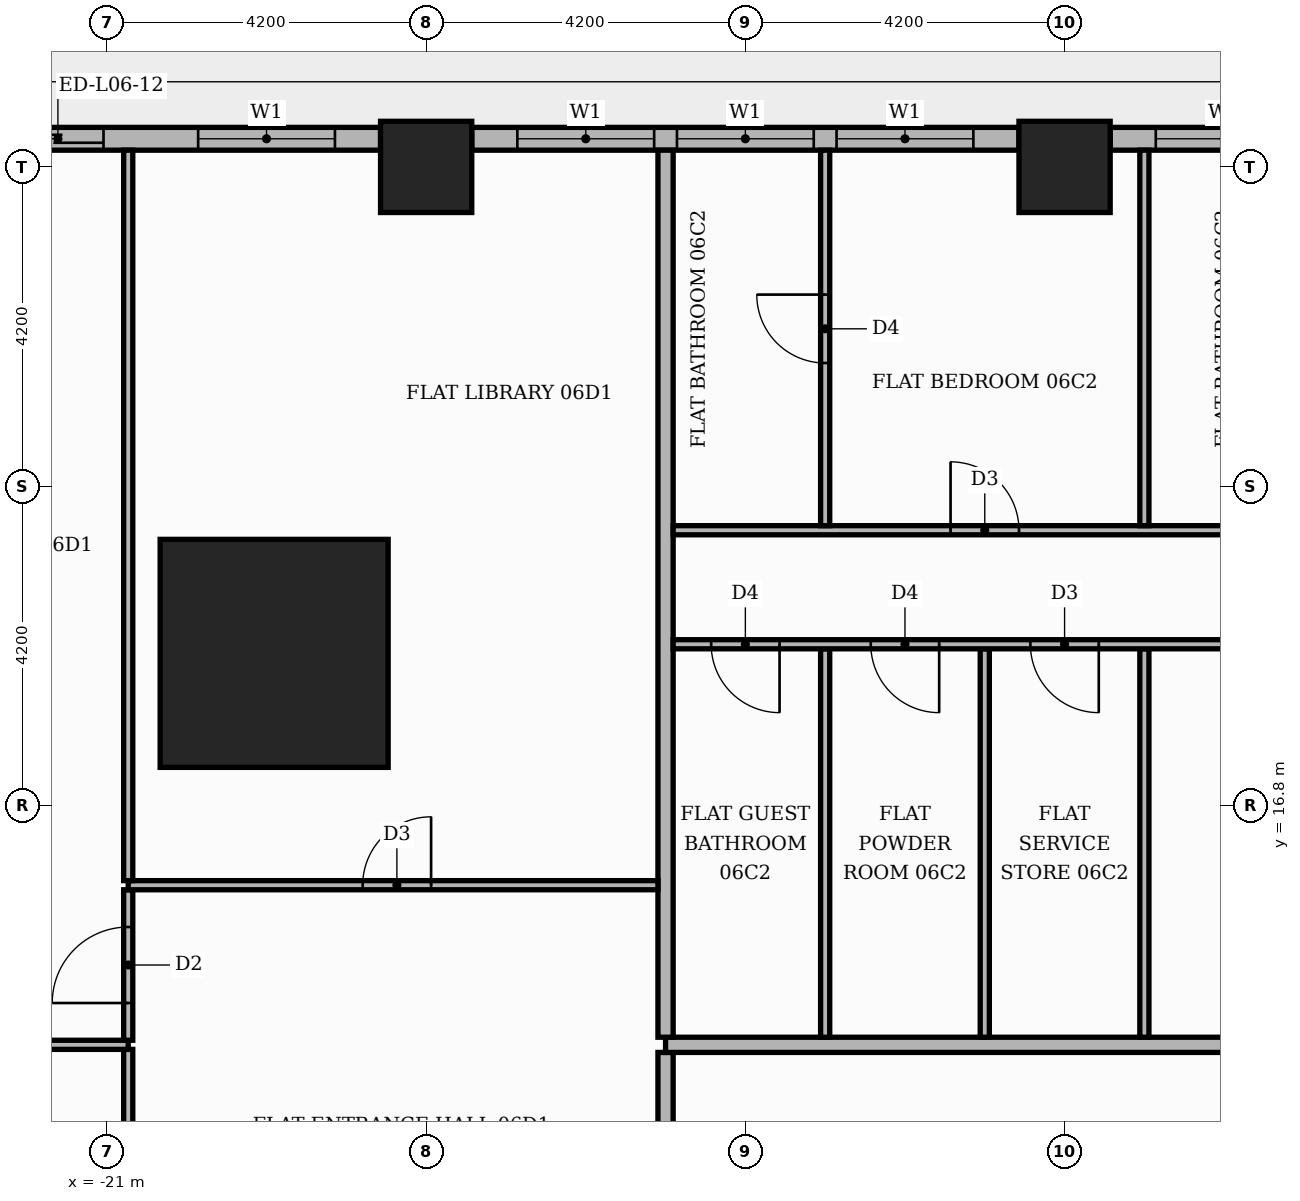
"""IFC4 building model, lengths in metres.
Left out: names, types, materials, properties, quantities, classifications, styles, units other than length and angle.
Written with IfcOpenShell. Run it as: python <this file> out.ifc"""

import sys

from ifc_helpers import new_model, si_unit, direction, frame, frame_2d, origin, origin_2d, place, context, subcontext, project, spatial, rectangle, extrude, element, fill, save


model = new_model("IFC4")
c1 = context("Model", 3, precision=1e-05, world=origin(), true_north=direction((0.0, 1.0)))
c2 = subcontext(c1, "Body", "Model", "MODEL_VIEW")
j1 = project(units=[si_unit("LENGTHUNIT", "METRE"), si_unit("PLANEANGLEUNIT", "RADIAN")], contexts=[c1])
p1 = place(None, origin())
s1 = spatial("IfcSite", under=j1, at=p1, CompositionType="ELEMENT")
p2 = place(p1, origin())
s2 = spatial("IfcBuilding", under=s1, at=p2, CompositionType="ELEMENT")
p3 = place(p2, frame((0.0, 0.0, 30.9)))
s3 = spatial("IfcBuildingStorey", under=s2, at=p3, CompositionType="ELEMENT", Elevation=30.9)
p4 = place(p3, frame((-18.8, 18.8, 0.0), z_axis=(0.0, 0.0, 1.0), x_axis=(1.0, 0.0, 0.0)))
e1 = element("IfcColumn", 1, at=p4, inside=s3, PredefinedType="COLUMN", context=c2, shape_type="SweptSolid", body=[
    extrude(rectangle(XDim=3.0, YDim=3.0, at=origin_2d()), origin(), (0.0, 0.0, 1.0), 3.9),
])
for number, where, z_axis, x_axis in (
    (2, (-8.4, 25.2, 0.0), (0.0, 0.0, 1.0), (1.0, 0.0, 0.0)),
    (3, (-16.8, 25.2, 0.0), (0.0, 0.0, 1.0), (1.0, 0.0, 0.0)),
):
    element("IfcColumn", number, at=place(p3, frame(where, z_axis=z_axis, x_axis=x_axis)), inside=s3, PredefinedType="COLUMN", context=c2, shape_type="SweptSolid", body=[
        extrude(rectangle(XDim=1.2, YDim=1.2, at=origin_2d()), origin(), (0.0, 0.0, 1.0), 3.9),
    ])
p5 = place(p3, frame((-0.6, 25.57, 0.0), z_axis=(0.0, 0.0, 1.0), x_axis=(-1.0, 0.0, 0.0)))
e4 = element("IfcWall", 4, at=p5, inside=s3, PredefinedType="STANDARD", context=c2, shape_type="SweptSolid", body=[
    extrude(rectangle(XDim=7.2, YDim=0.3, at=frame_2d((3.6, 0.0))), origin(), (0.0, 0.0, 1.0), 3.48),
])
p6 = place(p5, frame((0.6, 0.0, 0.0)))
e5 = element("IfcOpeningElement", 5, at=p6, cuts=e4, PredefinedType="OPENING", context=c2, shape_type="SweptSolid", body=[
    extrude(rectangle(XDim=1.8, YDim=2.4, at=frame_2d((0.9, 1.2))), frame((0.0, 0.16, 0.0), z_axis=(0.0, -1.0, 0.0), x_axis=(1.0, 0.0, 0.0)), (0.0, 0.0, 1.0), 0.32),
])
p7 = place(p5, frame((2.7, 0.0, 0.9)))
e6 = element("IfcOpeningElement", 6, at=p7, cuts=e4, PredefinedType="OPENING", context=c2, shape_type="SweptSolid", body=[
    extrude(rectangle(XDim=1.8, YDim=2.1, at=frame_2d((0.9, 1.05))), frame((0.0, 0.16, 0.0), z_axis=(0.0, -1.0, 0.0), x_axis=(1.0, 0.0, 0.0)), (0.0, 0.0, 1.0), 0.32),
])
p8 = place(p5, frame((4.8, 0.0, 0.9)))
e7 = element("IfcOpeningElement", 7, at=p8, cuts=e4, PredefinedType="OPENING", context=c2, shape_type="SweptSolid", body=[
    extrude(rectangle(XDim=1.8, YDim=2.1, at=frame_2d((0.9, 1.05))), frame((0.0, 0.16, 0.0), z_axis=(0.0, -1.0, 0.0), x_axis=(1.0, 0.0, 0.0)), (0.0, 0.0, 1.0), 0.32),
])
p9 = place(p3, frame((-9.0, 25.57, 0.0), z_axis=(0.0, 0.0, 1.0), x_axis=(-1.0, 0.0, 0.0)))
e8 = element("IfcWall", 8, at=p9, inside=s3, PredefinedType="STANDARD", context=c2, shape_type="SweptSolid", body=[
    extrude(rectangle(XDim=7.2, YDim=0.3, at=frame_2d((3.6, 0.0))), origin(), (0.0, 0.0, 1.0), 3.48),
])
p10 = place(p9, frame((0.6, 0.0, 0.9)))
e9 = element("IfcOpeningElement", 9, at=p10, cuts=e8, PredefinedType="OPENING", context=c2, shape_type="SweptSolid", body=[
    extrude(rectangle(XDim=1.8, YDim=2.1, at=frame_2d((0.9, 1.05))), frame((0.0, 0.16, 0.0), z_axis=(0.0, -1.0, 0.0), x_axis=(1.0, 0.0, 0.0)), (0.0, 0.0, 1.0), 0.32),
])
p11 = place(p9, frame((2.7, 0.0, 0.9)))
e10 = element("IfcOpeningElement", 10, at=p11, cuts=e8, PredefinedType="OPENING", context=c2, shape_type="SweptSolid", body=[
    extrude(rectangle(XDim=1.8, YDim=2.1, at=frame_2d((0.9, 1.05))), frame((0.0, 0.16, 0.0), z_axis=(0.0, -1.0, 0.0), x_axis=(1.0, 0.0, 0.0)), (0.0, 0.0, 1.0), 0.32),
])
p12 = place(p9, frame((4.8, 0.0, 0.9)))
e11 = element("IfcOpeningElement", 11, at=p12, cuts=e8, PredefinedType="OPENING", context=c2, shape_type="SweptSolid", body=[
    extrude(rectangle(XDim=1.8, YDim=2.1, at=frame_2d((0.9, 1.05))), frame((0.0, 0.16, 0.0), z_axis=(0.0, -1.0, 0.0), x_axis=(1.0, 0.0, 0.0)), (0.0, 0.0, 1.0), 0.32),
])
p13 = place(p3, frame((-17.4, 25.57, 0.0), z_axis=(0.0, 0.0, 1.0), x_axis=(-1.0, 0.0, 0.0)))
e12 = element("IfcWall", 12, at=p13, inside=s3, PredefinedType="STANDARD", context=c2, shape_type="SweptSolid", body=[
    extrude(rectangle(XDim=5.32, YDim=0.3, at=frame_2d((2.66, 0.0))), origin(), (0.0, 0.0, 1.0), 3.48),
])
p14 = place(p13, frame((0.6, 0.0, 0.9)))
e13 = element("IfcOpeningElement", 13, at=p14, cuts=e12, PredefinedType="OPENING", context=c2, shape_type="SweptSolid", body=[
    extrude(rectangle(XDim=1.8, YDim=2.1, at=frame_2d((0.9, 1.05))), frame((0.0, 0.16, 0.0), z_axis=(0.0, -1.0, 0.0), x_axis=(1.0, 0.0, 0.0)), (0.0, 0.0, 1.0), 0.32),
])
p15 = place(p13, frame((3.645, 0.0, 0.0)))
e14 = element("IfcOpeningElement", 14, at=p15, cuts=e12, PredefinedType="OPENING", context=c2, shape_type="SweptSolid", body=[
    extrude(rectangle(XDim=1.2, YDim=2.4, at=frame_2d((0.6, 1.2))), frame((0.0, 0.16, 0.0), z_axis=(0.0, -1.0, 0.0), x_axis=(1.0, 0.0, 0.0)), (0.0, 0.0, 1.0), 0.32),
])
p16 = place(p3, frame((-13.65, -13.55, 0.0), z_axis=(0.0, 0.0, 1.0), x_axis=(0.0, 1.0, 0.0)))
e15 = element("IfcWall", 15, at=p16, inside=s3, PredefinedType="PARTITIONING", context=c2, shape_type="SweptSolid", body=[
    extrude(rectangle(XDim=27.1, YDim=0.2, at=frame_2d((13.55, 0.0))), origin(), (0.0, 0.0, 1.0), 3.48),
])
p17 = place(p16, frame((24.55, 0.0, 0.0)))
e16 = element("IfcOpeningElement", 16, at=p17, cuts=e15, PredefinedType="OPENING", context=c2, shape_type="SweptSolid", body=[
    extrude(rectangle(XDim=1.1, YDim=2.4, at=frame_2d((0.55, 1.2))), frame((0.0, 0.11, 0.0), z_axis=(0.0, -1.0, 0.0), x_axis=(1.0, 0.0, 0.0)), (0.0, 0.0, 1.0), 0.22),
])
p18 = place(p3, frame((-20.72, 9.51, 0.0), z_axis=(0.0, 0.0, 1.0), x_axis=(0.0, 1.0, 0.0)))
e17 = element("IfcWall", 17, at=p18, inside=s3, PredefinedType="PARTITIONING", context=c2, shape_type="SweptSolid", body=[
    extrude(rectangle(XDim=4.08, YDim=0.12, at=frame_2d((2.04, 0.0))), origin(), (0.0, 0.0, 1.0), 3.48),
])
p19 = place(p18, frame((1.59, 0.0, 0.0)))
e18 = element("IfcOpeningElement", 18, at=p19, cuts=e17, PredefinedType="OPENING", context=c2, shape_type="SweptSolid", body=[
    extrude(rectangle(XDim=0.9, YDim=2.1, at=frame_2d((0.45, 1.05))), frame((0.0, 0.07, 0.0), z_axis=(0.0, -1.0, 0.0), x_axis=(1.0, 0.0, 0.0)), (0.0, 0.0, 1.0), 0.14),
])
p20 = place(p3, frame((-25.42, 13.65, 0.0), z_axis=(0.0, 0.0, 1.0), x_axis=(1.0, 0.0, 0.0)))
e19 = element("IfcWall", 19, at=p20, inside=s3, PredefinedType="PARTITIONING", context=c2, shape_type="SweptSolid", body=[
    extrude(rectangle(XDim=4.7, YDim=0.12, at=frame_2d((2.35, 0.0))), origin(), (0.0, 0.0, 1.0), 3.48),
])
p21 = place(p3, frame((-13.65, 13.65, 0.0), z_axis=(0.0, 0.0, 1.0), x_axis=(1.0, 0.0, 0.0)))
e20 = element("IfcWall", 20, at=p21, inside=s3, PredefinedType="PARTITIONING", context=c2, shape_type="SweptSolid", body=[
    extrude(rectangle(XDim=39.07, YDim=0.2, at=frame_2d((19.535, 0.0))), origin(), (0.0, 0.0, 1.0), 3.48),
])
p22 = place(p21, frame((24.65, 0.0, 0.0)))
e21 = element("IfcOpeningElement", 21, at=p22, cuts=e20, PredefinedType="OPENING", context=c2, shape_type="SweptSolid", body=[
    extrude(rectangle(XDim=1.1, YDim=2.4, at=frame_2d((0.55, 1.2))), frame((0.0, 0.11, 0.0), z_axis=(0.0, -1.0, 0.0), x_axis=(1.0, 0.0, 0.0)), (0.0, 0.0, 1.0), 0.22),
])
p23 = place(p21, frame((14.15, 0.0, 0.0)))
e22 = element("IfcOpeningElement", 22, at=p23, cuts=e20, PredefinedType="OPENING", context=c2, shape_type="SweptSolid", body=[
    extrude(rectangle(XDim=1.1, YDim=2.4, at=frame_2d((0.55, 1.2))), frame((0.0, 0.11, 0.0), z_axis=(0.0, -1.0, 0.0), x_axis=(1.0, 0.0, 0.0)), (0.0, 0.0, 1.0), 0.22),
])
p24 = place(p3, frame((-20.72, 13.71, 0.0), z_axis=(0.0, 0.0, 1.0), x_axis=(0.0, 1.0, 0.0)))
e23 = element("IfcWall", 23, at=p24, inside=s3, PredefinedType="PARTITIONING", context=c2, shape_type="SweptSolid", body=[
    extrude(rectangle(XDim=1.98, YDim=0.12, at=frame_2d((0.99, 0.0))), origin(), (0.0, 0.0, 1.0), 3.48),
])
p25 = place(p24, frame((0.49, 0.0, 0.0)))
e24 = element("IfcOpeningElement", 24, at=p25, cuts=e23, PredefinedType="OPENING", context=c2, shape_type="SweptSolid", body=[
    extrude(rectangle(XDim=1.0, YDim=2.1, at=frame_2d((0.5, 1.05))), frame((0.0, 0.07, 0.0), z_axis=(0.0, -1.0, 0.0), x_axis=(1.0, 0.0, 0.0)), (0.0, 0.0, 1.0), 0.14),
])
p26 = place(p3, frame((-13.65, 13.75, 0.0), z_axis=(0.0, 0.0, 1.0), x_axis=(0.0, 1.0, 0.0)))
e25 = element("IfcWall", 25, at=p26, inside=s3, PredefinedType="PARTITIONING", context=c2, shape_type="SweptSolid", body=[
    extrude(rectangle(XDim=11.67, YDim=0.2, at=frame_2d((5.835, 0.0))), origin(), (0.0, 0.0, 1.0), 3.48),
])
for number, where, z_axis, x_axis in (
    (26, (-11.55, 13.75, 0.0), (0.0, 0.0, 1.0), (0.0, 1.0, 0.0)),
    (27, (-9.45, 13.75, 0.0), (0.0, 0.0, 1.0), (0.0, 1.0, 0.0)),
    (28, (-7.35, 13.75, 0.0), (0.0, 0.0, 1.0), (0.0, 1.0, 0.0)),
):
    element("IfcWall", number, at=place(p3, frame(where, z_axis=z_axis, x_axis=x_axis)), inside=s3, PredefinedType="PARTITIONING", context=c2, shape_type="SweptSolid", body=[
        extrude(rectangle(XDim=5.11, YDim=0.12, at=frame_2d((2.555, 0.0))), origin(), (0.0, 0.0, 1.0), 3.48),
    ])
p27 = place(p3, frame((-20.72, 15.75, 0.0), z_axis=(0.0, 0.0, 1.0), x_axis=(1.0, 0.0, 0.0)))
e29 = element("IfcWall", 29, at=p27, inside=s3, PredefinedType="PARTITIONING", context=c2, shape_type="SweptSolid", body=[
    extrude(rectangle(XDim=6.97, YDim=0.12, at=frame_2d((3.485, 0.0))), origin(), (0.0, 0.0, 1.0), 3.48),
])
p28 = place(p27, frame((3.085, 0.0, 0.0)))
e30 = element("IfcOpeningElement", 30, at=p28, cuts=e29, PredefinedType="OPENING", context=c2, shape_type="SweptSolid", body=[
    extrude(rectangle(XDim=0.9, YDim=2.1, at=frame_2d((0.45, 1.05))), frame((0.0, 0.07, 0.0), z_axis=(0.0, -1.0, 0.0), x_axis=(1.0, 0.0, 0.0)), (0.0, 0.0, 1.0), 0.14),
])
p29 = place(p3, frame((-20.72, 15.81, 0.0), z_axis=(0.0, 0.0, 1.0), x_axis=(0.0, 1.0, 0.0)))
e31 = element("IfcWall", 31, at=p29, inside=s3, PredefinedType="PARTITIONING", context=c2, shape_type="SweptSolid", body=[
    extrude(rectangle(XDim=9.61, YDim=0.12, at=frame_2d((4.805, 0.0))), origin(), (0.0, 0.0, 1.0), 3.48),
])
p30 = place(p3, frame((-13.55, 18.92, 0.0), z_axis=(0.0, 0.0, 1.0), x_axis=(1.0, 0.0, 0.0)))
e32 = element("IfcWall", 32, at=p30, inside=s3, PredefinedType="PARTITIONING", context=c2, shape_type="SweptSolid", body=[
    extrude(rectangle(XDim=12.5, YDim=0.12, at=frame_2d((6.25, 0.0))), origin(), (0.0, 0.0, 1.0), 3.48),
])
p31 = place(p30, frame((8.9, 0.0, 0.0)))
e33 = element("IfcOpeningElement", 33, at=p31, cuts=e32, PredefinedType="OPENING", context=c2, shape_type="SweptSolid", body=[
    extrude(rectangle(XDim=0.9, YDim=2.1, at=frame_2d((0.45, 1.05))), frame((0.0, 0.07, 0.0), z_axis=(0.0, -1.0, 0.0), x_axis=(1.0, 0.0, 0.0)), (0.0, 0.0, 1.0), 0.14),
])
p32 = place(p30, frame((4.7, 0.0, 0.0)))
e34 = element("IfcOpeningElement", 34, at=p32, cuts=e32, PredefinedType="OPENING", context=c2, shape_type="SweptSolid", body=[
    extrude(rectangle(XDim=0.9, YDim=2.1, at=frame_2d((0.45, 1.05))), frame((0.0, 0.07, 0.0), z_axis=(0.0, -1.0, 0.0), x_axis=(1.0, 0.0, 0.0)), (0.0, 0.0, 1.0), 0.14),
])
p33 = place(p30, frame((2.6, 0.0, 0.0)))
e35 = element("IfcOpeningElement", 35, at=p33, cuts=e32, PredefinedType="OPENING", context=c2, shape_type="SweptSolid", body=[
    extrude(rectangle(XDim=0.9, YDim=2.1, at=frame_2d((0.45, 1.05))), frame((0.0, 0.07, 0.0), z_axis=(0.0, -1.0, 0.0), x_axis=(1.0, 0.0, 0.0)), (0.0, 0.0, 1.0), 0.14),
])
p34 = place(p30, frame((0.5, 0.0, 0.0)))
e36 = element("IfcOpeningElement", 36, at=p34, cuts=e32, PredefinedType="OPENING", context=c2, shape_type="SweptSolid", body=[
    extrude(rectangle(XDim=0.9, YDim=2.1, at=frame_2d((0.45, 1.05))), frame((0.0, 0.07, 0.0), z_axis=(0.0, -1.0, 0.0), x_axis=(1.0, 0.0, 0.0)), (0.0, 0.0, 1.0), 0.14),
])
p35 = place(p3, frame((-13.55, 20.42, 0.0), z_axis=(0.0, 0.0, 1.0), x_axis=(1.0, 0.0, 0.0)))
e37 = element("IfcWall", 37, at=p35, inside=s3, PredefinedType="PARTITIONING", context=c2, shape_type="SweptSolid", body=[
    extrude(rectangle(XDim=18.7, YDim=0.12, at=frame_2d((9.35, 0.0))), origin(), (0.0, 0.0, 1.0), 3.48),
])
p36 = place(p35, frame((16.2, 0.0, 0.0)))
e38 = element("IfcOpeningElement", 38, at=p36, cuts=e37, PredefinedType="OPENING", context=c2, shape_type="SweptSolid", body=[
    extrude(rectangle(XDim=1.0, YDim=2.1, at=frame_2d((0.5, 1.05))), frame((0.0, 0.07, 0.0), z_axis=(0.0, -1.0, 0.0), x_axis=(1.0, 0.0, 0.0)), (0.0, 0.0, 1.0), 0.14),
])
p37 = place(p35, frame((12.05, 0.0, 0.0)))
e39 = element("IfcOpeningElement", 39, at=p37, cuts=e37, PredefinedType="OPENING", context=c2, shape_type="SweptSolid", body=[
    extrude(rectangle(XDim=0.9, YDim=2.1, at=frame_2d((0.45, 1.05))), frame((0.0, 0.07, 0.0), z_axis=(0.0, -1.0, 0.0), x_axis=(1.0, 0.0, 0.0)), (0.0, 0.0, 1.0), 0.14),
])
p38 = place(p35, frame((3.65, 0.0, 0.0)))
e40 = element("IfcOpeningElement", 40, at=p38, cuts=e37, PredefinedType="OPENING", context=c2, shape_type="SweptSolid", body=[
    extrude(rectangle(XDim=0.9, YDim=2.1, at=frame_2d((0.45, 1.05))), frame((0.0, 0.07, 0.0), z_axis=(0.0, -1.0, 0.0), x_axis=(1.0, 0.0, 0.0)), (0.0, 0.0, 1.0), 0.14),
])
p39 = place(p3, frame((-11.55, 20.48, 0.0), z_axis=(0.0, 0.0, 1.0), x_axis=(0.0, 1.0, 0.0)))
e41 = element("IfcWall", 41, at=p39, inside=s3, PredefinedType="PARTITIONING", context=c2, shape_type="SweptSolid", body=[
    extrude(rectangle(XDim=4.94, YDim=0.12, at=frame_2d((2.47, 0.0))), origin(), (0.0, 0.0, 1.0), 3.48),
])
p40 = place(p39, frame((2.14, 0.0, 0.0)))
e42 = element("IfcOpeningElement", 42, at=p40, cuts=e41, PredefinedType="OPENING", context=c2, shape_type="SweptSolid", body=[
    extrude(rectangle(XDim=0.9, YDim=2.1, at=frame_2d((0.45, 1.05))), frame((0.0, 0.07, 0.0), z_axis=(0.0, -1.0, 0.0), x_axis=(1.0, 0.0, 0.0)), (0.0, 0.0, 1.0), 0.14),
])
p41 = place(p3, frame((-7.35, 20.48, 0.0), z_axis=(0.0, 0.0, 1.0), x_axis=(0.0, 1.0, 0.0)))
e43 = element("IfcWall", 43, at=p41, inside=s3, PredefinedType="PARTITIONING", context=c2, shape_type="SweptSolid", body=[
    extrude(rectangle(XDim=4.94, YDim=0.12, at=frame_2d((2.47, 0.0))), origin(), (0.0, 0.0, 1.0), 3.48),
])
p42 = place(p8, origin())
e44 = element("IfcWindow", 44, at=p42, inside=s3, PartitioningType="SINGLE_PANEL", PredefinedType="WINDOW", context=c2, shape_type="SweptSolid", body=[
    extrude(rectangle(XDim=1.8, YDim=2.1, at=frame_2d((0.9, 1.05))), frame((0.0, 0.03, 0.0), z_axis=(0.0, -1.0, 0.0), x_axis=(1.0, 0.0, 0.0)), (0.0, 0.0, 1.0), 0.06),
])
fill(e7, e44)
p43 = place(p10, origin())
e45 = element("IfcWindow", 45, at=p43, inside=s3, PartitioningType="SINGLE_PANEL", PredefinedType="WINDOW", context=c2, shape_type="SweptSolid", body=[
    extrude(rectangle(XDim=1.8, YDim=2.1, at=frame_2d((0.9, 1.05))), frame((0.0, 0.03, 0.0), z_axis=(0.0, -1.0, 0.0), x_axis=(1.0, 0.0, 0.0)), (0.0, 0.0, 1.0), 0.06),
])
fill(e9, e45)
p44 = place(p11, origin())
e46 = element("IfcWindow", 46, at=p44, inside=s3, PartitioningType="SINGLE_PANEL", PredefinedType="WINDOW", context=c2, shape_type="SweptSolid", body=[
    extrude(rectangle(XDim=1.8, YDim=2.1, at=frame_2d((0.9, 1.05))), frame((0.0, 0.03, 0.0), z_axis=(0.0, -1.0, 0.0), x_axis=(1.0, 0.0, 0.0)), (0.0, 0.0, 1.0), 0.06),
])
fill(e10, e46)
p45 = place(p12, origin())
e47 = element("IfcWindow", 47, at=p45, inside=s3, PartitioningType="SINGLE_PANEL", PredefinedType="WINDOW", context=c2, shape_type="SweptSolid", body=[
    extrude(rectangle(XDim=1.8, YDim=2.1, at=frame_2d((0.9, 1.05))), frame((0.0, 0.03, 0.0), z_axis=(0.0, -1.0, 0.0), x_axis=(1.0, 0.0, 0.0)), (0.0, 0.0, 1.0), 0.06),
])
fill(e11, e47)
p46 = place(p14, origin())
e48 = element("IfcWindow", 48, at=p46, inside=s3, PartitioningType="SINGLE_PANEL", PredefinedType="WINDOW", context=c2, shape_type="SweptSolid", body=[
    extrude(rectangle(XDim=1.8, YDim=2.1, at=frame_2d((0.9, 1.05))), frame((0.0, 0.03, 0.0), z_axis=(0.0, -1.0, 0.0), x_axis=(1.0, 0.0, 0.0)), (0.0, 0.0, 1.0), 0.06),
])
fill(e13, e48)
p47 = place(p15, origin())
e49 = element("IfcDoor", 49, at=p47, inside=s3, OperationType="SLIDING_TO_RIGHT", PredefinedType="DOOR", context=c2, shape_type="SweptSolid", body=[
    extrude(rectangle(XDim=1.2, YDim=2.4, at=frame_2d((0.6, 1.2))), frame((0.0, 0.025, 0.0), z_axis=(0.0, -1.0, 0.0), x_axis=(1.0, 0.0, 0.0)), (0.0, 0.0, 1.0), 0.05),
])
fill(e14, e49)
p48 = place(p32, frame((0.9, 0.0, 0.0), z_axis=(0.0, 0.0, 1.0), x_axis=(-1.0, 0.0, 0.0)))
e50 = element("IfcDoor", 50, at=p48, inside=s3, OperationType="SINGLE_SWING_RIGHT", PredefinedType="DOOR", context=c2, shape_type="SweptSolid", body=[
    extrude(rectangle(XDim=0.9, YDim=2.1, at=frame_2d((0.45, 1.05))), frame((0.0, 0.025, 0.0), z_axis=(0.0, -1.0, 0.0), x_axis=(1.0, 0.0, 0.0)), (0.0, 0.0, 1.0), 0.05),
])
fill(e34, e50)
p49 = place(p33, frame((0.9, 0.0, 0.0), z_axis=(0.0, 0.0, 1.0), x_axis=(-1.0, 0.0, 0.0)))
e51 = element("IfcDoor", 51, at=p49, inside=s3, OperationType="SINGLE_SWING_RIGHT", PredefinedType="DOOR", context=c2, shape_type="SweptSolid", body=[
    extrude(rectangle(XDim=0.9, YDim=2.1, at=frame_2d((0.45, 1.05))), frame((0.0, 0.025, 0.0), z_axis=(0.0, -1.0, 0.0), x_axis=(1.0, 0.0, 0.0)), (0.0, 0.0, 1.0), 0.05),
])
fill(e35, e51)
p50 = place(p34, frame((0.9, 0.0, 0.0), z_axis=(0.0, 0.0, 1.0), x_axis=(-1.0, 0.0, 0.0)))
e52 = element("IfcDoor", 52, at=p50, inside=s3, OperationType="SINGLE_SWING_RIGHT", PredefinedType="DOOR", context=c2, shape_type="SweptSolid", body=[
    extrude(rectangle(XDim=0.9, YDim=2.1, at=frame_2d((0.45, 1.05))), frame((0.0, 0.025, 0.0), z_axis=(0.0, -1.0, 0.0), x_axis=(1.0, 0.0, 0.0)), (0.0, 0.0, 1.0), 0.05),
])
fill(e36, e52)
p51 = place(p38, origin())
e53 = element("IfcDoor", 53, at=p51, inside=s3, OperationType="SINGLE_SWING_LEFT", PredefinedType="DOOR", context=c2, shape_type="SweptSolid", body=[
    extrude(rectangle(XDim=0.9, YDim=2.1, at=frame_2d((0.45, 1.05))), frame((0.0, 0.025, 0.0), z_axis=(0.0, -1.0, 0.0), x_axis=(1.0, 0.0, 0.0)), (0.0, 0.0, 1.0), 0.05),
])
fill(e40, e53)
p52 = place(p40, origin())
e54 = element("IfcDoor", 54, at=p52, inside=s3, OperationType="SINGLE_SWING_RIGHT", PredefinedType="DOOR", context=c2, shape_type="SweptSolid", body=[
    extrude(rectangle(XDim=0.9, YDim=2.1, at=frame_2d((0.45, 1.05))), frame((0.0, 0.025, 0.0), z_axis=(0.0, -1.0, 0.0), x_axis=(1.0, 0.0, 0.0)), (0.0, 0.0, 1.0), 0.05),
])
fill(e42, e54)
p53 = place(p28, origin())
e55 = element("IfcDoor", 55, at=p53, inside=s3, OperationType="SINGLE_SWING_RIGHT", PredefinedType="DOOR", context=c2, shape_type="SweptSolid", body=[
    extrude(rectangle(XDim=0.9, YDim=2.1, at=frame_2d((0.45, 1.05))), frame((0.0, 0.025, 0.0), z_axis=(0.0, -1.0, 0.0), x_axis=(1.0, 0.0, 0.0)), (0.0, 0.0, 1.0), 0.05),
])
fill(e30, e55)
p54 = place(p25, origin())
e56 = element("IfcDoor", 56, at=p54, inside=s3, OperationType="SINGLE_SWING_LEFT", PredefinedType="DOOR", context=c2, shape_type="SweptSolid", body=[
    extrude(rectangle(XDim=1.0, YDim=2.1, at=frame_2d((0.5, 1.05))), frame((0.0, 0.025, 0.0), z_axis=(0.0, -1.0, 0.0), x_axis=(1.0, 0.0, 0.0)), (0.0, 0.0, 1.0), 0.05),
])
fill(e24, e56)
save(model, sys.argv[1])
